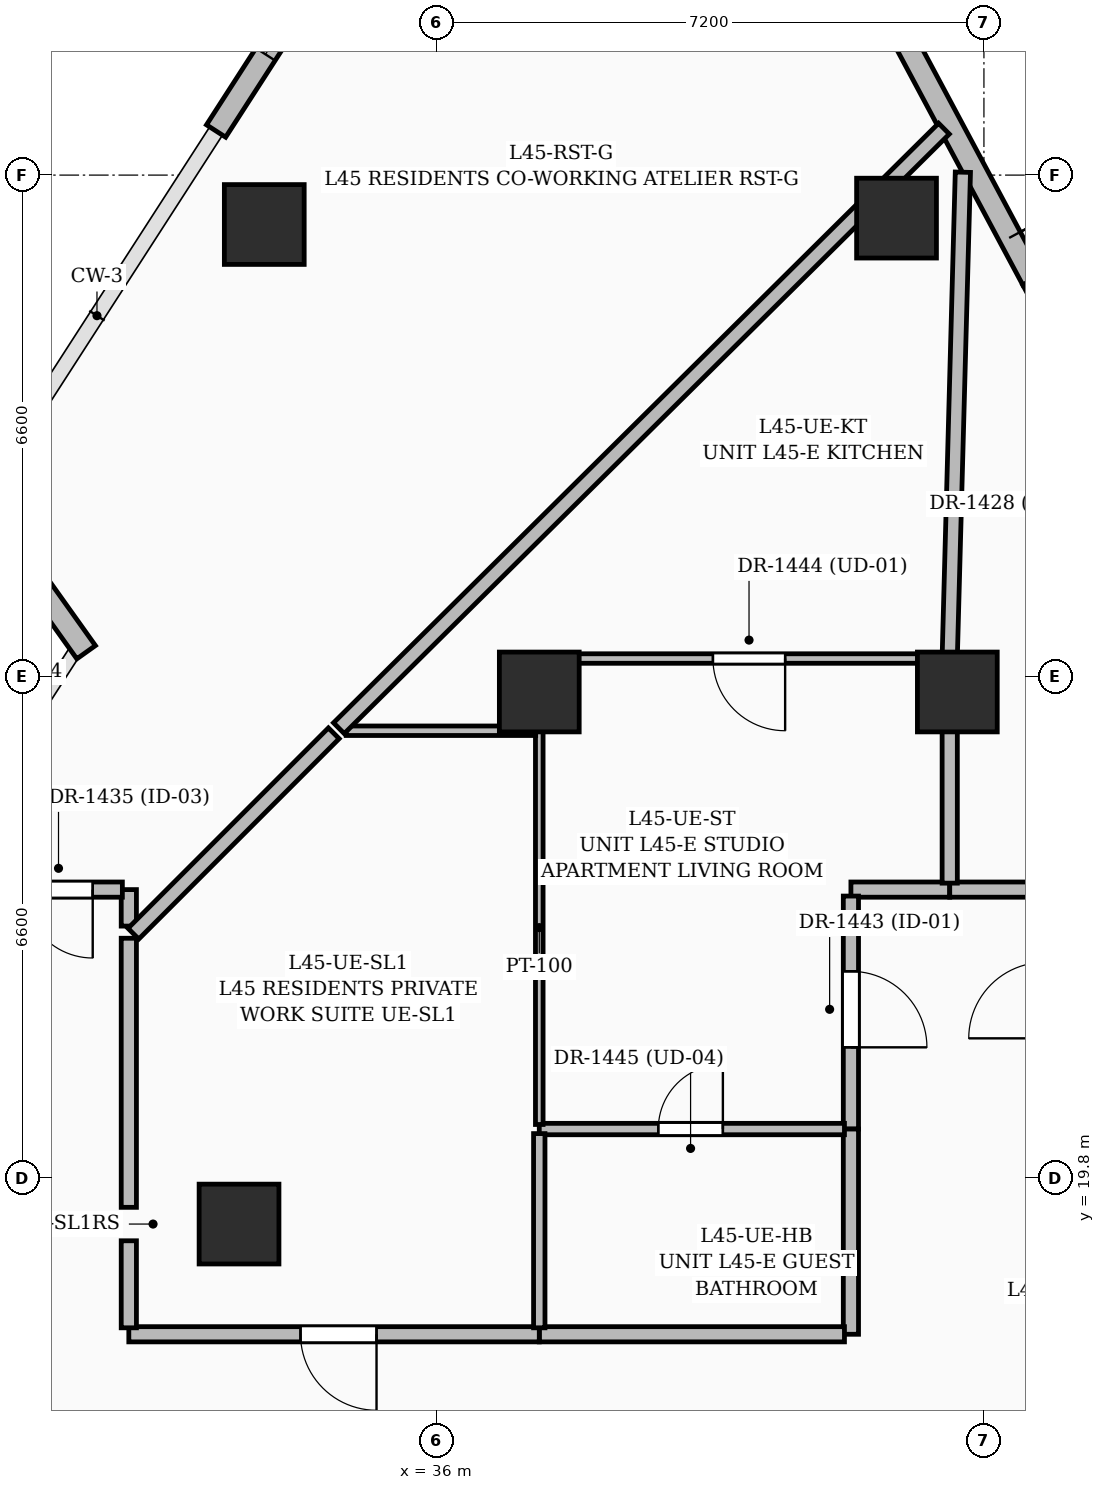
"""IFC4 building model, lengths in metres.
Left out: names, types, materials, properties, quantities, classifications, styles, units other than length and angle.
Written with IfcOpenShell. Run it as: python <this file> out.ifc"""

import sys

from ifc_helpers import new_model, si_unit, direction, frame, frame_2d, origin, origin_2d, place, context, subcontext, project, spatial, rectangle, extrude, element, fill, save


model = new_model("IFC4")
c1 = context("Model", 3, precision=1e-05, world=origin(), true_north=direction((0.0, 1.0)))
c2 = subcontext(c1, "Body", "Model", "MODEL_VIEW")
j1 = project(units=[si_unit("LENGTHUNIT", "METRE"), si_unit("PLANEANGLEUNIT", "RADIAN")], contexts=[c1])
p1 = place(None, origin())
s1 = spatial("IfcSite", under=j1, at=p1, CompositionType="ELEMENT")
p2 = place(p1, origin())
s2 = spatial("IfcBuilding", under=s1, at=p2, CompositionType="ELEMENT")
p3 = place(p2, frame((0.0, 0.0, 175.2)))
s3 = spatial("IfcBuildingStorey", under=s2, at=p3, CompositionType="ELEMENT", Elevation=175.2)
for number, where, z_axis, x_axis in (
    (1, (42.85, 26.2, 0.0), (0.0, 0.0, 1.0), (1.0, 0.0, 0.0)),
    (2, (37.35, 26.2, 0.0), (0.0, 0.0, 1.0), (1.0, 0.0, 0.0)),
    (3, (33.4, 19.2, 0.0), (0.0, 0.0, 1.0), (1.0, 0.0, 0.0)),
    (4, (42.05, 32.434, 0.0), (0.0, 0.0, 1.0), (1.0, 0.0, 0.0)),
    (5, (33.732, 32.35, 0.0), (0.0, 0.0, 1.0), (1.0, 0.0, 0.0)),
):
    element("IfcColumn", number, at=place(p3, frame(where, z_axis=z_axis, x_axis=x_axis)), inside=s3, PredefinedType="COLUMN", context=c2, shape_type="SweptSolid", body=[
        extrude(rectangle(XDim=1.05, YDim=1.05, at=origin_2d()), origin(), (0.0, 0.0, 1.0), 3.6),
    ])
p4 = place(p3, frame((31.388, 26.723, 0.0), z_axis=(0.0, 0.0, 1.0), x_axis=(-0.580409797139, 0.814324546716, 0.0)))
e6 = element("IfcWall", 6, at=p4, inside=s3, PredefinedType="SOLIDWALL", context=c2, shape_type="SweptSolid", body=[
    extrude(rectangle(XDim=2.594, YDim=0.3, at=frame_2d((1.297, 0.0))), origin(), (0.0, 0.0, 1.0), 2.575),
])
p5 = place(p3, frame((33.098, 33.58, 0.0), z_axis=(0.0, 0.0, 1.0), x_axis=(0.542037422538, 0.840354349408, 0.0)))
e7 = element("IfcWall", 7, at=p5, inside=s3, PredefinedType="SOLIDWALL", context=c2, shape_type="SweptSolid", body=[
    extrude(rectangle(XDim=5.782, YDim=0.3, at=frame_2d((2.891, 0.0))), origin(), (0.0, 0.0, 1.0), 3.35),
])
p6 = place(p5, frame((1.2, 0.0, 0.6)))
e8 = element("IfcOpeningElement", 8, at=p6, cuts=e7, PredefinedType="OPENING", context=c2, shape_type="SweptSolid", body=[
    extrude(rectangle(XDim=2.4, YDim=2.1, at=frame_2d((1.2, 1.05))), frame((0.0, 0.16, 0.0), z_axis=(0.0, -1.0, 0.0), x_axis=(1.0, 0.0, 0.0)), (0.0, 0.0, 1.0), 0.32),
])
p7 = place(p3, frame((40.495, 37.885, 0.0), z_axis=(0.0, 0.0, 1.0), x_axis=(0.471731834897, -0.88174206883, 0.0)))
e9 = element("IfcWall", 9, at=p7, inside=s3, PredefinedType="SOLIDWALL", context=c2, shape_type="SweptSolid", body=[
    extrude(rectangle(XDim=7.1, YDim=0.3, at=frame_2d((3.55, 0.0))), origin(), (0.0, 0.0, 1.0), 3.35),
])
p8 = place(p7, frame((2.22, 0.0, 0.8)))
e10 = element("IfcOpeningElement", 10, at=p8, cuts=e9, PredefinedType="OPENING", context=c2, shape_type="SweptSolid", body=[
    extrude(rectangle(XDim=1.2, YDim=1.8, at=frame_2d((0.6, 0.9))), frame((0.0, 0.16, 0.0), z_axis=(0.0, -1.0, 0.0), x_axis=(1.0, 0.0, 0.0)), (0.0, 0.0, 1.0), 0.32),
])
p9 = place(p3, frame((43.844, 31.625, 0.0), z_axis=(0.0, 0.0, 1.0), x_axis=(0.471736169991, -0.881739749542, 0.0)))
e11 = element("IfcWall", 11, at=p9, inside=s3, PredefinedType="SOLIDWALL", context=c2, shape_type="SweptSolid", body=[
    extrude(rectangle(XDim=7.68, YDim=0.3, at=frame_2d((3.84, 0.0))), origin(), (0.0, 0.0, 1.0), 3.35),
])
p10 = place(p9, frame((1.59, 0.0, 0.0)))
e12 = element("IfcOpeningElement", 12, at=p10, cuts=e11, PredefinedType="OPENING", context=c2, shape_type="SweptSolid", body=[
    extrude(rectangle(XDim=1.0, YDim=2.2, at=frame_2d((0.5, 1.1))), frame((0.0, 0.16, 0.0), z_axis=(0.0, -1.0, 0.0), x_axis=(1.0, 0.0, 0.0)), (0.0, 0.0, 1.0), 0.32),
])
p11 = place(p3, frame((42.75, 23.6, 0.0), z_axis=(0.0, 0.0, 1.0), x_axis=(-1.0, 0.0, 0.0)))
e13 = element("IfcWall", 13, at=p11, inside=s3, PredefinedType="PARTITIONING", context=c2, shape_type="SweptSolid", body=[
    extrude(rectangle(XDim=1.3, YDim=0.2, at=frame_2d((0.65, 0.0))), origin(), (0.0, 0.0, 1.0), 3.35),
])
p12 = place(p3, frame((41.45, 23.515, 0.0), z_axis=(0.0, 0.0, 1.0), x_axis=(0.0, -1.0, 0.0)))
e14 = element("IfcWall", 14, at=p12, inside=s3, PredefinedType="PARTITIONING", context=c2, shape_type="SweptSolid", body=[
    extrude(rectangle(XDim=3.065, YDim=0.2, at=frame_2d((1.532, 0.0))), origin(), (0.0, 0.0, 1.0), 3.35),
])
p13 = place(p12, frame((0.99, 0.0, 0.0)))
e15 = element("IfcOpeningElement", 15, at=p13, cuts=e14, PredefinedType="OPENING", context=c2, shape_type="SweptSolid", body=[
    extrude(rectangle(XDim=1.0, YDim=2.2, at=frame_2d((0.5, 1.1))), frame((0.0, 0.11, 0.0), z_axis=(0.0, -1.0, 0.0), x_axis=(1.0, 0.0, 0.0)), (0.0, 0.0, 1.0), 0.22),
])
p14 = place(p3, frame((41.45, 20.45, 0.0), z_axis=(0.0, 0.0, 1.0), x_axis=(0.0, -1.0, 0.0)))
e16 = element("IfcWall", 16, at=p14, inside=s3, PredefinedType="PARTITIONING", context=c2, shape_type="SweptSolid", body=[
    extrude(rectangle(XDim=2.7, YDim=0.2, at=frame_2d((1.35, 0.0))), origin(), (0.0, 0.0, 1.0), 2.853),
])
p15 = place(p3, frame((41.365, 17.75, 0.0), z_axis=(0.0, 0.0, 1.0), x_axis=(-1.0, 0.0, 0.0)))
e17 = element("IfcWall", 17, at=p15, inside=s3, PredefinedType="PARTITIONING", context=c2, shape_type="SweptSolid", body=[
    extrude(rectangle(XDim=4.015, YDim=0.2, at=frame_2d((2.007, 0.0))), origin(), (0.0, 0.0, 1.0), 3.35),
])
p16 = place(p3, frame((37.35, 17.75, 0.0), z_axis=(0.0, 0.0, 1.0), x_axis=(-1.0, 0.0, 0.0)))
e18 = element("IfcWall", 18, at=p16, inside=s3, PredefinedType="PARTITIONING", context=c2, shape_type="SweptSolid", body=[
    extrude(rectangle(XDim=5.4, YDim=0.2, at=frame_2d((2.7, 0.0))), origin(), (0.0, 0.0, 1.0), 2.436),
])
p17 = place(p16, frame((2.141, 0.0, 0.0)))
e19 = element("IfcOpeningElement", 19, at=p17, cuts=e18, PredefinedType="OPENING", context=c2, shape_type="SweptSolid", body=[
    extrude(rectangle(XDim=1.0, YDim=2.2, at=frame_2d((0.5, 1.1))), frame((0.0, 0.11, 0.0), z_axis=(0.0, -1.0, 0.0), x_axis=(1.0, 0.0, 0.0)), (0.0, 0.0, 1.0), 0.22),
])
p18 = place(p3, frame((31.95, 17.835, 0.0), z_axis=(0.0, 0.0, 1.0), x_axis=(0.0, 1.0, 0.0)))
e20 = element("IfcWall", 20, at=p18, inside=s3, PredefinedType="PARTITIONING", context=c2, shape_type="SweptSolid", body=[
    extrude(rectangle(XDim=1.145, YDim=0.2, at=frame_2d((0.573, 0.0))), origin(), (0.0, 0.0, 1.0), 3.35),
])
p19 = place(p3, frame((31.95, 19.42, 0.0), z_axis=(0.0, 0.0, 1.0), x_axis=(0.0, 1.0, 0.0)))
e21 = element("IfcWall", 21, at=p19, inside=s3, PredefinedType="PARTITIONING", context=c2, shape_type="SweptSolid", body=[
    extrude(rectangle(XDim=3.54, YDim=0.2, at=frame_2d((1.77, 0.0))), origin(), (0.0, 0.0, 1.0), 2.464),
])
p20 = place(p3, frame((43.915, 23.6, 0.0), z_axis=(0.0, 0.0, 1.0), x_axis=(-1.0, 0.0, 0.0)))
e22 = element("IfcWall", 22, at=p20, inside=s3, PredefinedType="PARTITIONING", context=c2, shape_type="SweptSolid", body=[
    extrude(rectangle(XDim=1.165, YDim=0.2, at=frame_2d((0.583, 0.0))), origin(), (0.0, 0.0, 1.0), 2.436),
])
p21 = place(p3, frame((31.95, 23.12, 0.0), z_axis=(0.0, 0.0, 1.0), x_axis=(0.0, 1.0, 0.0)))
e23 = element("IfcWall", 23, at=p21, inside=s3, PredefinedType="PARTITIONING", context=c2, shape_type="SweptSolid", body=[
    extrude(rectangle(XDim=0.48, YDim=0.2, at=frame_2d((0.24, 0.0))), origin(), (0.0, 0.0, 1.0), 2.86),
])
p22 = place(p3, frame((31.865, 23.6, 0.0), z_axis=(0.0, 0.0, 1.0), x_axis=(-1.0, 0.0, 0.0)))
e24 = element("IfcWall", 24, at=p22, inside=s3, PredefinedType="PARTITIONING", context=c2, shape_type="SweptSolid", body=[
    extrude(rectangle(XDim=1.765, YDim=0.2, at=frame_2d((0.882, 0.0))), origin(), (0.0, 0.0, 1.0), 3.35),
])
p23 = place(p22, frame((0.39, 0.0, 0.0)))
e25 = element("IfcOpeningElement", 25, at=p23, cuts=e24, PredefinedType="OPENING", context=c2, shape_type="SweptSolid", body=[
    extrude(rectangle(XDim=0.9, YDim=2.1, at=frame_2d((0.45, 1.05))), frame((0.0, 0.11, 0.0), z_axis=(0.0, -1.0, 0.0), x_axis=(1.0, 0.0, 0.0)), (0.0, 0.0, 1.0), 0.22),
])
p24 = place(p3, frame((37.35, 20.45, 0.0), z_axis=(0.0, 0.0, 1.0), x_axis=(1.0, 0.0, 0.0)))
e26 = element("IfcWall", 26, at=p24, inside=s3, PredefinedType="PARTITIONING", context=c2, shape_type="SweptSolid", body=[
    extrude(rectangle(XDim=4.015, YDim=0.15, at=frame_2d((2.007, 0.0))), origin(), (0.0, 0.0, 1.0), 3.35),
])
p25 = place(p24, frame((1.566, 0.0, 0.0)))
e27 = element("IfcOpeningElement", 27, at=p25, cuts=e26, PredefinedType="OPENING", context=c2, shape_type="SweptSolid", body=[
    extrude(rectangle(XDim=0.85, YDim=2.1, at=frame_2d((0.425, 1.05))), frame((0.0, 0.085, 0.0), z_axis=(0.0, -1.0, 0.0), x_axis=(1.0, 0.0, 0.0)), (0.0, 0.0, 1.0), 0.17),
])
p26 = place(p3, frame((42.75, 26.64, 0.0), z_axis=(0.0, 0.0, 1.0), x_axis=(-1.0, 0.0, 0.0)))
e28 = element("IfcWall", 28, at=p26, inside=s3, PredefinedType="PARTITIONING", context=c2, shape_type="SweptSolid", body=[
    extrude(rectangle(XDim=5.4, YDim=0.125, at=frame_2d((2.7, 0.0))), origin(), (0.0, 0.0, 1.0), 3.35),
])
p27 = place(p26, frame((2.165, 0.0, 0.0)))
e29 = element("IfcOpeningElement", 29, at=p27, cuts=e28, PredefinedType="OPENING", context=c2, shape_type="SweptSolid", body=[
    extrude(rectangle(XDim=0.95, YDim=2.2, at=frame_2d((0.475, 1.1))), frame((0.0, 0.072, 0.0), z_axis=(0.0, -1.0, 0.0), x_axis=(1.0, 0.0, 0.0)), (0.0, 0.0, 1.0), 0.145),
])
p28 = place(p3, frame((37.35, 26.593, 0.0), z_axis=(0.0, 0.0, 1.0), x_axis=(0.0, -1.0, 0.0)))
e30 = element("IfcWall", 30, at=p28, inside=s3, PredefinedType="PARTITIONING", context=c2, shape_type="SweptSolid", body=[
    extrude(rectangle(XDim=0.903, YDim=0.125, at=frame_2d((0.451, 0.0))), origin(), (0.0, 0.0, 1.0), 3.35),
])
p29 = place(p3, frame((37.35, 25.69, 0.0), z_axis=(0.0, 0.0, 1.0), x_axis=(0.0, -1.0, 0.0)))
e31 = element("IfcWall", 31, at=p29, inside=s3, PredefinedType="PARTITIONING", context=c2, shape_type="SweptSolid", body=[
    extrude(rectangle(XDim=5.18, YDim=0.1, at=frame_2d((2.59, 0.0))), origin(), (0.0, 0.0, 1.0), 3.35),
])
p30 = place(p3, frame((42.75, 23.685, 0.0), z_axis=(0.0, 0.0, 1.0), x_axis=(0.0, 1.0, 0.0)))
e32 = element("IfcWall", 32, at=p30, inside=s3, PredefinedType="PARTITIONING", context=c2, shape_type="SweptSolid", body=[
    extrude(rectangle(XDim=2.907, YDim=0.2, at=frame_2d((1.454, 0.0))), origin(), (0.0, 0.0, 1.0), 3.35),
])
p31 = place(p3, frame((37.35, 20.39, 0.0), z_axis=(0.0, 0.0, 1.0), x_axis=(0.0, -1.0, 0.0)))
e33 = element("IfcWall", 33, at=p31, inside=s3, PredefinedType="PARTITIONING", context=c2, shape_type="SweptSolid", body=[
    extrude(rectangle(XDim=2.555, YDim=0.15, at=frame_2d((1.277, 0.0))), origin(), (0.0, 0.0, 1.0), 2.853),
])
p32 = place(p3, frame((34.81, 25.69, 0.0), z_axis=(0.0, 0.0, 1.0), x_axis=(1.0, 0.0, 0.0)))
e34 = element("IfcWall", 34, at=p32, inside=s3, PredefinedType="PARTITIONING", context=c2, shape_type="SweptSolid", body=[
    extrude(rectangle(XDim=2.492, YDim=0.125, at=frame_2d((1.246, 0.0))), origin(), (0.0, 0.0, 1.0), 2.436),
])
p33 = place(p3, frame((42.751, 26.688, 0.0), z_axis=(0.0, 0.0, 1.0), x_axis=(0.027092926653, 0.999632919289, 0.0)))
e35 = element("IfcWall", 35, at=p33, inside=s3, PredefinedType="PARTITIONING", context=c2, shape_type="SweptSolid", body=[
    extrude(rectangle(XDim=6.353, YDim=0.2, at=frame_2d((3.177, 0.0))), origin(), (0.0, 0.0, 1.0), 2.464),
])
p34 = place(p3, frame((42.674, 33.611, 0.0), z_axis=(0.0, 0.0, 1.0), x_axis=(-0.710345403642, -0.703853257096, 0.0)))
e36 = element("IfcWall", 36, at=p34, inside=s3, PredefinedType="PARTITIONING", context=c2, shape_type="SweptSolid", body=[
    extrude(rectangle(XDim=11.207, YDim=0.2, at=frame_2d((5.603, 0.0))), origin(), (0.0, 0.0, 1.0), 2.464),
])
p35 = place(p3, frame((34.646, 25.656, 0.0), z_axis=(0.0, 0.0, 1.0), x_axis=(-0.707106781187, -0.707106781187, 0.0)))
e37 = element("IfcWall", 37, at=p35, inside=s3, PredefinedType="PARTITIONING", context=c2, shape_type="SweptSolid", body=[
    extrude(rectangle(XDim=3.729, YDim=0.2, at=frame_2d((1.864, 0.0))), origin(), (0.0, 0.0, 1.0), 2.86),
])
p36 = place(p6, origin())
e38 = element("IfcWindow", 38, at=p36, inside=s3, PartitioningType="SINGLE_PANEL", PredefinedType="WINDOW", context=c2, shape_type="SweptSolid", body=[
    extrude(rectangle(XDim=2.4, YDim=2.1, at=frame_2d((1.2, 1.05))), frame((0.0, 0.03, 0.0), z_axis=(0.0, -1.0, 0.0), x_axis=(1.0, 0.0, 0.0)), (0.0, 0.0, 1.0), 0.06),
])
fill(e8, e38)
p37 = place(p23, origin())
e39 = element("IfcDoor", 39, at=p37, inside=s3, OperationType="SINGLE_SWING_LEFT", PredefinedType="DOOR", context=c2, shape_type="SweptSolid", body=[
    extrude(rectangle(XDim=0.9, YDim=2.1, at=frame_2d((0.45, 1.05))), frame((0.0, 0.025, 0.0), z_axis=(0.0, -1.0, 0.0), x_axis=(1.0, 0.0, 0.0)), (0.0, 0.0, 1.0), 0.05),
])
fill(e25, e39)
p38 = place(p13, origin())
e40 = element("IfcDoor", 40, at=p38, inside=s3, OperationType="SINGLE_SWING_RIGHT", PredefinedType="DOOR", context=c2, shape_type="SweptSolid", body=[
    extrude(rectangle(XDim=1.0, YDim=2.2, at=frame_2d((0.5, 1.1))), frame((0.0, 0.025, 0.0), z_axis=(0.0, -1.0, 0.0), x_axis=(1.0, 0.0, 0.0)), (0.0, 0.0, 1.0), 0.05),
])
fill(e15, e40)
p39 = place(p27, origin())
e41 = element("IfcDoor", 41, at=p39, inside=s3, OperationType="SINGLE_SWING_LEFT", PredefinedType="DOOR", context=c2, shape_type="SweptSolid", body=[
    extrude(rectangle(XDim=0.95, YDim=2.2, at=frame_2d((0.475, 1.1))), frame((0.0, 0.025, 0.0), z_axis=(0.0, -1.0, 0.0), x_axis=(1.0, 0.0, 0.0)), (0.0, 0.0, 1.0), 0.05),
])
fill(e29, e41)
p40 = place(p25, origin())
e42 = element("IfcDoor", 42, at=p40, inside=s3, OperationType="SINGLE_SWING_RIGHT", PredefinedType="DOOR", context=c2, shape_type="SweptSolid", body=[
    extrude(rectangle(XDim=0.85, YDim=2.1, at=frame_2d((0.425, 1.05))), frame((0.0, 0.025, 0.0), z_axis=(0.0, -1.0, 0.0), x_axis=(1.0, 0.0, 0.0)), (0.0, 0.0, 1.0), 0.05),
])
fill(e27, e42)
p41 = place(p17, origin())
e43 = element("IfcDoor", 43, at=p41, inside=s3, OperationType="SINGLE_SWING_LEFT", PredefinedType="DOOR", context=c2, shape_type="SweptSolid", body=[
    extrude(rectangle(XDim=1.0, YDim=2.2, at=frame_2d((0.5, 1.1))), frame((0.0, 0.025, 0.0), z_axis=(0.0, -1.0, 0.0), x_axis=(1.0, 0.0, 0.0)), (0.0, 0.0, 1.0), 0.05),
])
fill(e19, e43)
save(model, sys.argv[1])
